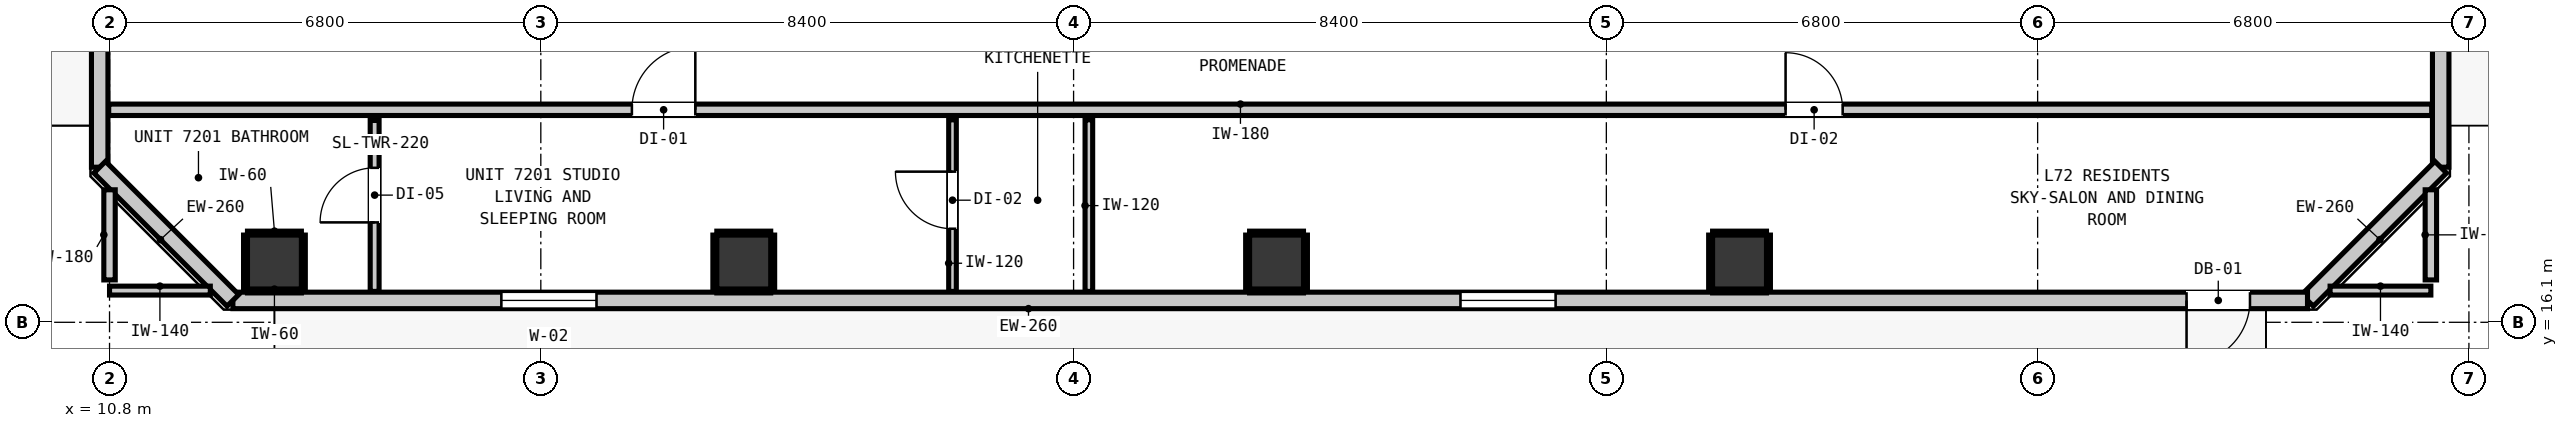
"""IFC4 building model, lengths in metres.
Left out: names, types, materials, properties, quantities, classifications, styles, units other than length and angle.
Written with IfcOpenShell. Run it as: python <this file> out.ifc"""

import sys

from ifc_helpers import new_model, si_unit, direction, frame, frame_2d, origin, origin_2d, place, context, subcontext, project, spatial, rectangle, extrude, element, fill, save


model = new_model("IFC4")
c1 = context("Model", 3, precision=1e-05, world=origin(), true_north=direction((0.0, 1.0)))
c2 = subcontext(c1, "Body", "Model", "MODEL_VIEW")
j1 = project(units=[si_unit("LENGTHUNIT", "METRE"), si_unit("PLANEANGLEUNIT", "RADIAN")], contexts=[c1])
p1 = place(None, origin())
s1 = spatial("IfcSite", under=j1, at=p1, CompositionType="ELEMENT")
p2 = place(p1, origin())
s2 = spatial("IfcBuilding", under=s1, at=p2, CompositionType="ELEMENT")
p3 = place(p2, frame((0.0, 0.0, 247.88)))
s3 = spatial("IfcBuildingStorey", under=s2, at=p3, CompositionType="ELEMENT", Elevation=247.88)
for number, where, z_axis, x_axis in (
    (1, (13.4, 17.05, 0.0), (0.0, 0.0, 1.0), (1.0, 0.0, 0.0)),
    (2, (20.8, 17.05, 0.0), (0.0, 0.0, 1.0), (1.0, 0.0, 0.0)),
    (3, (29.2, 17.05, 0.0), (0.0, 0.0, 1.0), (1.0, 0.0, 0.0)),
    (4, (36.5, 17.05, 0.0), (0.0, 0.0, 1.0), (1.0, 0.0, 0.0)),
):
    element("IfcColumn", number, at=place(p3, frame(where, z_axis=z_axis, x_axis=x_axis)), inside=s3, PredefinedType="COLUMN", context=c2, shape_type="SweptSolid", body=[
        extrude(rectangle(XDim=0.85, YDim=0.85, at=origin_2d()), origin(), (0.0, 0.0, 1.0), 2.9),
    ])
p4 = place(p3, frame((10.645, 18.545, 0.0), z_axis=(0.0, 0.0, 1.0), x_axis=(0.0, 1.0, 0.0)))
e5 = element("IfcWall", 5, at=p4, inside=s3, PredefinedType="STANDARD", context=c2, shape_type="SweptSolid", body=[
    extrude(rectangle(XDim=30.31, YDim=0.26, at=frame_2d((15.155, 0.0))), origin(), (0.0, 0.0, 1.0), 2.9),
])
p5 = place(p4, frame((24.171, 0.0, 0.0)))
e6 = element("IfcOpeningElement", 6, at=p5, cuts=e5, PredefinedType="OPENING", context=c2, shape_type="SweptSolid", body=[
    extrude(rectangle(XDim=1.0, YDim=2.15, at=frame_2d((0.5, 1.075))), frame((0.0, 0.14, 0.0), z_axis=(0.0, -1.0, 0.0), x_axis=(1.0, 0.0, 0.0)), (0.0, 0.0, 1.0), 0.28),
])
p6 = place(p4, frame((27.045, 0.0, 0.85)))
e7 = element("IfcOpeningElement", 7, at=p6, cuts=e5, PredefinedType="OPENING", context=c2, shape_type="SweptSolid", body=[
    extrude(rectangle(XDim=1.5, YDim=1.8, at=frame_2d((0.75, 0.9))), frame((0.0, 0.14, 0.0), z_axis=(0.0, -1.0, 0.0), x_axis=(1.0, 0.0, 0.0)), (0.0, 0.0, 1.0), 0.28),
])
p7 = place(p3, frame((47.555, 48.855, 0.0), z_axis=(0.0, 0.0, 1.0), x_axis=(0.0, -1.0, 0.0)))
e8 = element("IfcWall", 8, at=p7, inside=s3, PredefinedType="STANDARD", context=c2, shape_type="SweptSolid", body=[
    extrude(rectangle(XDim=30.31, YDim=0.26, at=frame_2d((15.155, 0.0))), origin(), (0.0, 0.0, 1.0), 2.9),
])
p8 = place(p7, frame((3.729, 0.0, 0.0)))
e9 = element("IfcOpeningElement", 9, at=p8, cuts=e8, PredefinedType="OPENING", context=c2, shape_type="SweptSolid", body=[
    extrude(rectangle(XDim=1.0, YDim=2.15, at=frame_2d((0.5, 1.075))), frame((0.0, 0.14, 0.0), z_axis=(0.0, -1.0, 0.0), x_axis=(1.0, 0.0, 0.0)), (0.0, 0.0, 1.0), 0.28),
])
p9 = place(p3, frame((47.555, 18.545, 0.0), z_axis=(0.0, 0.0, 1.0), x_axis=(-0.707106781187, -0.707106781187, 0.0)))
e10 = element("IfcWall", 10, at=p9, inside=s3, PredefinedType="STANDARD", context=c2, shape_type="SweptSolid", body=[
    extrude(rectangle(XDim=2.97, YDim=0.26, at=frame_2d((1.485, 0.0))), origin(), (0.0, 0.0, 1.0), 2.9),
])
p10 = place(p3, frame((45.455, 16.445, 0.0), z_axis=(0.0, 0.0, 1.0), x_axis=(-1.0, 0.0, 0.0)))
e11 = element("IfcWall", 11, at=p10, inside=s3, PredefinedType="STANDARD", context=c2, shape_type="SweptSolid", body=[
    extrude(rectangle(XDim=32.71, YDim=0.26, at=frame_2d((16.355, 0.0))), origin(), (0.0, 0.0, 1.0), 2.9),
])
p11 = place(p10, frame((0.907, 0.0, 0.0)))
e12 = element("IfcOpeningElement", 12, at=p11, cuts=e11, PredefinedType="OPENING", context=c2, shape_type="SweptSolid", body=[
    extrude(rectangle(XDim=1.0, YDim=2.15, at=frame_2d((0.5, 1.075))), frame((0.0, 0.14, 0.0), z_axis=(0.0, -1.0, 0.0), x_axis=(1.0, 0.0, 0.0)), (0.0, 0.0, 1.0), 0.28),
])
p12 = place(p10, frame((26.977, 0.0, 0.85)))
e13 = element("IfcOpeningElement", 13, at=p12, cuts=e11, PredefinedType="OPENING", context=c2, shape_type="SweptSolid", body=[
    extrude(rectangle(XDim=1.5, YDim=1.8, at=frame_2d((0.75, 0.9))), frame((0.0, 0.14, 0.0), z_axis=(0.0, -1.0, 0.0), x_axis=(1.0, 0.0, 0.0)), (0.0, 0.0, 1.0), 0.28),
])
p13 = place(p10, frame((11.855, 0.0, 0.85)))
e14 = element("IfcOpeningElement", 14, at=p13, cuts=e11, PredefinedType="OPENING", context=c2, shape_type="SweptSolid", body=[
    extrude(rectangle(XDim=1.5, YDim=1.8, at=frame_2d((0.75, 0.9))), frame((0.0, 0.14, 0.0), z_axis=(0.0, -1.0, 0.0), x_axis=(1.0, 0.0, 0.0)), (0.0, 0.0, 1.0), 0.28),
])
p14 = place(p3, frame((12.745, 16.445, 0.0), z_axis=(0.0, 0.0, 1.0), x_axis=(-0.707147883682, 0.707065676302, 0.0)))
e15 = element("IfcWall", 15, at=p14, inside=s3, PredefinedType="STANDARD", context=c2, shape_type="SweptSolid", body=[
    extrude(rectangle(XDim=2.97, YDim=0.26, at=frame_2d((1.485, 0.0))), origin(), (0.0, 0.0, 1.0), 2.9),
])
p15 = place(p3, frame((10.787, 19.45, 0.0), z_axis=(0.0, 0.0, 1.0), x_axis=(1.0, 0.0, 0.0)))
e16 = element("IfcWall", 16, at=p15, inside=s3, PredefinedType="PARTITIONING", context=c2, shape_type="SweptSolid", body=[
    extrude(rectangle(XDim=36.626, YDim=0.18, at=frame_2d((18.313, 0.0))), origin(), (0.0, 0.0, 1.0), 2.9),
])
p16 = place(p15, frame((8.249, 0.0, 0.0)))
e17 = element("IfcOpeningElement", 17, at=p16, cuts=e16, PredefinedType="OPENING", context=c2, shape_type="SweptSolid", body=[
    extrude(rectangle(XDim=1.0, YDim=2.15, at=frame_2d((0.5, 1.075))), frame((0.0, 0.1, 0.0), z_axis=(0.0, -1.0, 0.0), x_axis=(1.0, 0.0, 0.0)), (0.0, 0.0, 1.0), 0.2),
])
p17 = place(p15, frame((26.439, 0.0, 0.0)))
e18 = element("IfcOpeningElement", 18, at=p17, cuts=e16, PredefinedType="OPENING", context=c2, shape_type="SweptSolid", body=[
    extrude(rectangle(XDim=0.9, YDim=2.1, at=frame_2d((0.45, 1.05))), frame((0.0, 0.1, 0.0), z_axis=(0.0, -1.0, 0.0), x_axis=(1.0, 0.0, 0.0)), (0.0, 0.0, 1.0), 0.2),
])
for number, where, z_axis, x_axis in (
    (19, (10.8, 16.6, 0.0), (0.0, 0.0, 1.0), (1.0, 0.0, 0.0)),
    (20, (45.811, 16.6, 0.0), (0.0, 0.0, 1.0), (1.0, 0.0, 0.0)),
):
    element("IfcWall", number, at=place(p3, frame(where, z_axis=z_axis, x_axis=x_axis)), inside=s3, PredefinedType="PARTITIONING", context=c2, shape_type="SweptSolid", body=[
        extrude(rectangle(XDim=1.589, YDim=0.14, at=frame_2d((0.794, 0.0))), origin(), (0.0, 0.0, 1.0), 2.9),
    ])
for number, where, z_axis, x_axis in (
    (21, (10.8, 16.768, 0.0), (0.0, 0.0, 1.0), (0.0, 1.0, 0.0)),
    (22, (47.4, 16.768, 0.0), (0.0, 0.0, 1.0), (0.0, 1.0, 0.0)),
):
    element("IfcWall", number, at=place(p3, frame(where, z_axis=z_axis, x_axis=x_axis)), inside=s3, PredefinedType="PARTITIONING", context=c2, shape_type="SweptSolid", body=[
        extrude(rectangle(XDim=1.421, YDim=0.18, at=frame_2d((0.71, 0.0))), origin(), (0.0, 0.0, 1.0), 2.9),
    ])
p18 = place(p3, frame((14.98, 16.587, 0.0), z_axis=(0.0, 0.0, 1.0), x_axis=(0.0, 1.0, 0.0)))
e23 = element("IfcWall", 23, at=p18, inside=s3, PredefinedType="PARTITIONING", context=c2, shape_type="SweptSolid", body=[
    extrude(rectangle(XDim=2.695, YDim=0.14, at=frame_2d((1.348, 0.0))), origin(), (0.0, 0.0, 1.0), 2.9),
])
p19 = place(p18, frame((1.088, 0.0, 0.0)))
e24 = element("IfcOpeningElement", 24, at=p19, cuts=e23, PredefinedType="OPENING", context=c2, shape_type="SweptSolid", body=[
    extrude(rectangle(XDim=0.86, YDim=2.02, at=frame_2d((0.43, 1.01))), frame((0.0, 0.08, 0.0), z_axis=(0.0, -1.0, 0.0), x_axis=(1.0, 0.0, 0.0)), (0.0, 0.0, 1.0), 0.16),
])
p20 = place(p3, frame((24.091, 16.587, 0.0), z_axis=(0.0, 0.0, 1.0), x_axis=(0.0, 1.0, 0.0)))
e25 = element("IfcWall", 25, at=p20, inside=s3, PredefinedType="PARTITIONING", context=c2, shape_type="SweptSolid", body=[
    extrude(rectangle(XDim=2.705, YDim=0.12, at=frame_2d((1.353, 0.0))), origin(), (0.0, 0.0, 1.0), 2.9),
])
p21 = place(p20, frame((0.988, 0.0, 0.0)))
e26 = element("IfcOpeningElement", 26, at=p21, cuts=e25, PredefinedType="OPENING", context=c2, shape_type="SweptSolid", body=[
    extrude(rectangle(XDim=0.9, YDim=2.1, at=frame_2d((0.45, 1.05))), frame((0.0, 0.07, 0.0), z_axis=(0.0, -1.0, 0.0), x_axis=(1.0, 0.0, 0.0)), (0.0, 0.0, 1.0), 0.14),
])
p22 = place(p3, frame((26.241, 16.587, 0.0), z_axis=(0.0, 0.0, 1.0), x_axis=(0.0, 1.0, 0.0)))
e27 = element("IfcWall", 27, at=p22, inside=s3, PredefinedType="PARTITIONING", context=c2, shape_type="SweptSolid", body=[
    extrude(rectangle(XDim=2.705, YDim=0.12, at=frame_2d((1.353, 0.0))), origin(), (0.0, 0.0, 1.0), 2.9),
])
for number, where, z_axis, x_axis in (
    (28, (12.975, 16.593, 0.0), (0.0, 0.0, 1.0), (1.0, 0.0, 0.0)),
    (29, (12.975, 17.507, 0.0), (0.0, 0.0, 1.0), (1.0, 0.0, 0.0)),
):
    element("IfcWall", number, at=place(p3, frame(where, z_axis=z_axis, x_axis=x_axis)), inside=s3, PredefinedType="PARTITIONING", context=c2, shape_type="SweptSolid", body=[
        extrude(rectangle(XDim=0.85, YDim=0.06, at=frame_2d((0.425, 0.0))), origin(), (0.0, 0.0, 1.0), 1.45),
    ])
for number, where, z_axis, x_axis in (
    (30, (12.943, 16.625, 0.0), (0.0, 0.0, 1.0), (0.0, 1.0, 0.0)),
    (31, (13.857, 16.625, 0.0), (0.0, 0.0, 1.0), (0.0, 1.0, 0.0)),
):
    element("IfcWall", number, at=place(p3, frame(where, z_axis=z_axis, x_axis=x_axis)), inside=s3, PredefinedType="PARTITIONING", context=c2, shape_type="SweptSolid", body=[
        extrude(rectangle(XDim=0.85, YDim=0.06, at=frame_2d((0.425, 0.0))), origin(), (0.0, 0.0, 1.0), 0.905),
    ])
for number, where, z_axis, x_axis in (
    (32, (20.375, 16.593, 0.0), (0.0, 0.0, 1.0), (1.0, 0.0, 0.0)),
    (33, (20.375, 17.507, 0.0), (0.0, 0.0, 1.0), (1.0, 0.0, 0.0)),
):
    element("IfcWall", number, at=place(p3, frame(where, z_axis=z_axis, x_axis=x_axis)), inside=s3, PredefinedType="PARTITIONING", context=c2, shape_type="SweptSolid", body=[
        extrude(rectangle(XDim=0.85, YDim=0.06, at=frame_2d((0.425, 0.0))), origin(), (0.0, 0.0, 1.0), 1.45),
    ])
for number, where, z_axis, x_axis in (
    (34, (20.343, 16.625, 0.0), (0.0, 0.0, 1.0), (0.0, 1.0, 0.0)),
    (35, (21.257, 16.625, 0.0), (0.0, 0.0, 1.0), (0.0, 1.0, 0.0)),
):
    element("IfcWall", number, at=place(p3, frame(where, z_axis=z_axis, x_axis=x_axis)), inside=s3, PredefinedType="PARTITIONING", context=c2, shape_type="SweptSolid", body=[
        extrude(rectangle(XDim=0.85, YDim=0.06, at=frame_2d((0.425, 0.0))), origin(), (0.0, 0.0, 1.0), 0.905),
    ])
for number, where, z_axis, x_axis in (
    (36, (28.775, 16.593, 0.0), (0.0, 0.0, 1.0), (1.0, 0.0, 0.0)),
    (37, (28.775, 17.507, 0.0), (0.0, 0.0, 1.0), (1.0, 0.0, 0.0)),
):
    element("IfcWall", number, at=place(p3, frame(where, z_axis=z_axis, x_axis=x_axis)), inside=s3, PredefinedType="PARTITIONING", context=c2, shape_type="SweptSolid", body=[
        extrude(rectangle(XDim=0.85, YDim=0.06, at=frame_2d((0.425, 0.0))), origin(), (0.0, 0.0, 1.0), 1.45),
    ])
for number, where, z_axis, x_axis in (
    (38, (28.743, 16.625, 0.0), (0.0, 0.0, 1.0), (0.0, 1.0, 0.0)),
    (39, (29.657, 16.625, 0.0), (0.0, 0.0, 1.0), (0.0, 1.0, 0.0)),
):
    element("IfcWall", number, at=place(p3, frame(where, z_axis=z_axis, x_axis=x_axis)), inside=s3, PredefinedType="PARTITIONING", context=c2, shape_type="SweptSolid", body=[
        extrude(rectangle(XDim=0.85, YDim=0.06, at=frame_2d((0.425, 0.0))), origin(), (0.0, 0.0, 1.0), 0.905),
    ])
for number, where, z_axis, x_axis in (
    (40, (36.075, 16.593, 0.0), (0.0, 0.0, 1.0), (1.0, 0.0, 0.0)),
    (41, (36.075, 17.507, 0.0), (0.0, 0.0, 1.0), (1.0, 0.0, 0.0)),
):
    element("IfcWall", number, at=place(p3, frame(where, z_axis=z_axis, x_axis=x_axis)), inside=s3, PredefinedType="PARTITIONING", context=c2, shape_type="SweptSolid", body=[
        extrude(rectangle(XDim=0.85, YDim=0.06, at=frame_2d((0.425, 0.0))), origin(), (0.0, 0.0, 1.0), 1.45),
    ])
for number, where, z_axis, x_axis in (
    (42, (36.043, 16.625, 0.0), (0.0, 0.0, 1.0), (0.0, 1.0, 0.0)),
    (43, (36.957, 16.625, 0.0), (0.0, 0.0, 1.0), (0.0, 1.0, 0.0)),
):
    element("IfcWall", number, at=place(p3, frame(where, z_axis=z_axis, x_axis=x_axis)), inside=s3, PredefinedType="PARTITIONING", context=c2, shape_type="SweptSolid", body=[
        extrude(rectangle(XDim=0.85, YDim=0.06, at=frame_2d((0.425, 0.0))), origin(), (0.0, 0.0, 1.0), 0.905),
    ])
p23 = place(p11, origin())
e44 = element("IfcDoor", 44, at=p23, inside=s3, OperationType="SINGLE_SWING_RIGHT", PredefinedType="DOOR", context=c2, shape_type="SweptSolid", body=[
    extrude(rectangle(XDim=1.0, YDim=2.15, at=frame_2d((0.5, 1.075))), frame((0.0, 0.025, 0.0), z_axis=(0.0, -1.0, 0.0), x_axis=(1.0, 0.0, 0.0)), (0.0, 0.0, 1.0), 0.05),
])
fill(e12, e44)
p24 = place(p12, origin())
e45 = element("IfcWindow", 45, at=p24, inside=s3, PartitioningType="SINGLE_PANEL", PredefinedType="WINDOW", context=c2, shape_type="SweptSolid", body=[
    extrude(rectangle(XDim=1.5, YDim=1.8, at=frame_2d((0.75, 0.9))), frame((0.0, 0.03, 0.0), z_axis=(0.0, -1.0, 0.0), x_axis=(1.0, 0.0, 0.0)), (0.0, 0.0, 1.0), 0.06),
])
fill(e13, e45)
p25 = place(p13, origin())
e46 = element("IfcWindow", 46, at=p25, inside=s3, PartitioningType="SINGLE_PANEL", PredefinedType="WINDOW", context=c2, shape_type="SweptSolid", body=[
    extrude(rectangle(XDim=1.5, YDim=1.8, at=frame_2d((0.75, 0.9))), frame((0.0, 0.03, 0.0), z_axis=(0.0, -1.0, 0.0), x_axis=(1.0, 0.0, 0.0)), (0.0, 0.0, 1.0), 0.06),
])
fill(e14, e46)
p26 = place(p16, origin())
e47 = element("IfcDoor", 47, at=p26, inside=s3, OperationType="SINGLE_SWING_RIGHT", PredefinedType="DOOR", context=c2, shape_type="SweptSolid", body=[
    extrude(rectangle(XDim=1.0, YDim=2.15, at=frame_2d((0.5, 1.075))), frame((0.0, 0.025, 0.0), z_axis=(0.0, -1.0, 0.0), x_axis=(1.0, 0.0, 0.0)), (0.0, 0.0, 1.0), 0.05),
])
fill(e17, e47)
p27 = place(p19, origin())
e48 = element("IfcDoor", 48, at=p27, inside=s3, OperationType="SINGLE_SWING_LEFT", PredefinedType="DOOR", context=c2, shape_type="SweptSolid", body=[
    extrude(rectangle(XDim=0.86, YDim=2.02, at=frame_2d((0.43, 1.01))), frame((0.0, 0.025, 0.0), z_axis=(0.0, -1.0, 0.0), x_axis=(1.0, 0.0, 0.0)), (0.0, 0.0, 1.0), 0.05),
])
fill(e24, e48)
p28 = place(p21, origin())
e49 = element("IfcDoor", 49, at=p28, inside=s3, OperationType="SINGLE_SWING_RIGHT", PredefinedType="DOOR", context=c2, shape_type="SweptSolid", body=[
    extrude(rectangle(XDim=0.9, YDim=2.1, at=frame_2d((0.45, 1.05))), frame((0.0, 0.025, 0.0), z_axis=(0.0, -1.0, 0.0), x_axis=(1.0, 0.0, 0.0)), (0.0, 0.0, 1.0), 0.05),
])
fill(e26, e49)
p29 = place(p17, origin())
e50 = element("IfcDoor", 50, at=p29, inside=s3, OperationType="SINGLE_SWING_LEFT", PredefinedType="DOOR", context=c2, shape_type="SweptSolid", body=[
    extrude(rectangle(XDim=0.9, YDim=2.1, at=frame_2d((0.45, 1.05))), frame((0.0, 0.025, 0.0), z_axis=(0.0, -1.0, 0.0), x_axis=(1.0, 0.0, 0.0)), (0.0, 0.0, 1.0), 0.05),
])
fill(e18, e50)
save(model, sys.argv[1])
